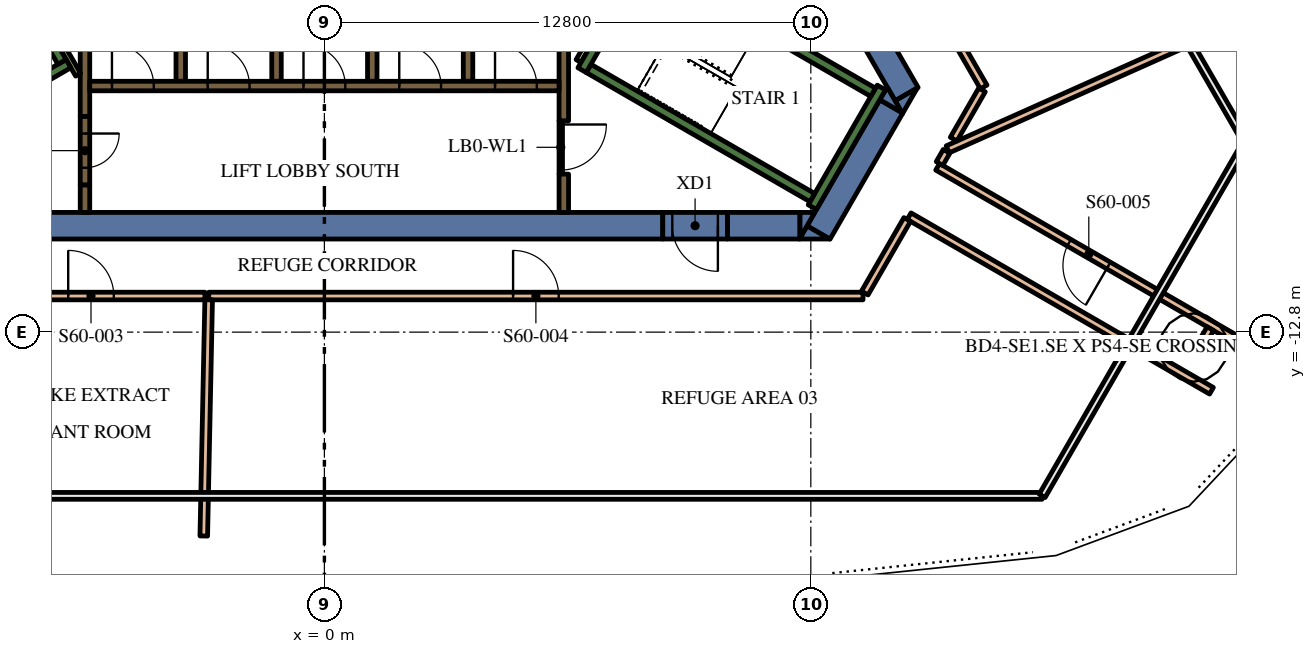
"""IFC4 building model, lengths in metres.
Left out: names, types, materials, properties, quantities, classifications, styles, units other than length and angle.
Written with IfcOpenShell. Run it as: python <this file> out.ifc"""

import sys

from ifc_helpers import new_model, si_unit, direction, frame, frame_2d, origin, place, context, subcontext, project, spatial, polyline, rectangle, outline, extrude, element, fill, save


model = new_model("IFC4")
c1 = context("Model", 3, precision=1e-05, world=origin(), true_north=direction((0.0, 1.0)))
c2 = subcontext(c1, "Body", "Model", "MODEL_VIEW")
j1 = project(units=[si_unit("LENGTHUNIT", "METRE"), si_unit("PLANEANGLEUNIT", "RADIAN")], contexts=[c1])
p1 = place(None, origin())
s1 = spatial("IfcSite", under=j1, at=p1, CompositionType="ELEMENT")
p2 = place(p1, origin())
s2 = spatial("IfcBuilding", under=s1, at=p2, CompositionType="ELEMENT")
p3 = place(p2, frame((0.0, 0.0, 256.2)))
s3 = spatial("IfcBuildingStorey", under=s2, at=p3, CompositionType="ELEMENT", Elevation=256.2)
p4 = place(p3, frame((9.085, 4.264, 0.0), z_axis=(0.0, 0.0, 1.0), x_axis=(0.499998082512, -0.866026510844, 0.0)))
e1 = element("IfcWall", 1, at=p4, inside=s3, PredefinedType="SOLIDWALL", context=c2, shape_type="SweptSolid", body=[
    extrude(rectangle(XDim=12.472, YDim=0.7, at=frame_2d((6.236, 0.0))), origin(), (0.0, 0.0, 1.0), 5.4),
])
p5 = place(p3, origin())
e2 = element("IfcWall", 2, at=p5, inside=s3, PredefinedType="SOLIDWALL", context=c2, shape_type="SweptSolid", body=[
    extrude(outline(polyline([(15.213, -7.05), (15.019, -6.714), (15.601, -6.378), (15.213, -7.05)])), origin(), (0.0, 0.0, 1.0), 5.4),
])
p6 = place(p3, frame((13.003, -10.179, 0.0), z_axis=(0.0, 0.0, 1.0), x_axis=(0.499972675833, 0.866041178825, 0.0)))
e3 = element("IfcWall", 3, at=p6, inside=s3, PredefinedType="SOLIDWALL", context=c2, shape_type="SweptSolid", body=[
    extrude(rectangle(XDim=3.829, YDim=0.7, at=frame_2d((1.915, 0.0))), origin(), (0.0, 0.0, 1.0), 5.4),
])
e4 = element("IfcWall", 4, at=p5, inside=s3, PredefinedType="SOLIDWALL", context=c2, shape_type="SweptSolid", body=[
    extrude(outline(polyline([(12.698, -10.005), (13.296, -10.35), (12.5, -10.35), (12.698, -10.005)])), origin(), (0.0, 0.0, 1.0), 5.4),
])
e5 = element("IfcWall", 5, at=p5, inside=s3, PredefinedType="SOLIDWALL", context=c2, shape_type="SweptSolid", body=[
    extrude(outline(polyline([(14.809, -6.35), (15.197, -7.022), (14.615, -6.686), (14.809, -6.35)])), origin(), (0.0, 0.0, 1.0), 5.4),
])
p7 = place(p3, frame((10.604, -10.0, 0.0), z_axis=(0.0, 0.0, 1.0), x_axis=(1.0, 0.0, 0.0)))
e6 = element("IfcWall", 6, at=p7, inside=s3, PredefinedType="SOLIDWALL", context=c2, shape_type="SweptSolid", body=[
    extrude(rectangle(XDim=1.909, YDim=0.7, at=frame_2d((0.955, 0.0))), origin(), (0.0, 0.0, 1.0), 5.4),
])
e7 = element("IfcWall", 7, at=p5, inside=s3, PredefinedType="SOLIDWALL", context=c2, shape_type="SweptSolid", body=[
    extrude(outline(polyline([(12.904, -9.65), (12.516, -10.322), (12.516, -9.65), (12.904, -9.65)])), origin(), (0.0, 0.0, 1.0), 5.4),
])
p8 = place(p3, frame((8.904, -10.0, 0.0), z_axis=(0.0, 0.0, 1.0), x_axis=(-1.0, 0.0, 0.0)))
e8 = element("IfcWall", 8, at=p8, inside=s3, PredefinedType="SOLIDWALL", context=c2, shape_type="SweptSolid", body=[
    extrude(rectangle(XDim=22.226, YDim=0.7, at=frame_2d((11.113, 0.0))), origin(), (0.0, 0.0, 1.0), 5.4),
])
p9 = place(p3, frame((12.84, -9.511, 0.0), z_axis=(0.0, 0.0, 1.0), x_axis=(0.500048121057, 0.865997619297, 0.0)))
e9 = element("IfcWall", 9, at=p9, inside=s3, PredefinedType="SOLIDWALL", context=c2, shape_type="SweptSolid", body=[
    extrude(rectangle(XDim=3.634, YDim=0.25, at=frame_2d((1.817, 0.0))), origin(), (0.0, 0.0, 1.0), 5.4),
])
p10 = place(p3, frame((12.84, -9.261, 0.0), z_axis=(0.0, 0.0, 1.0), x_axis=(-0.866013990052, 0.500019768644, 0.0)))
e10 = element("IfcWall", 10, at=p10, inside=s3, PredefinedType="SOLIDWALL", context=c2, shape_type="SweptSolid", body=[
    extrude(rectangle(XDim=6.8, YDim=0.25, at=frame_2d((3.4, 0.0))), origin(), (0.0, 0.0, 1.0), 5.4),
])
p11 = place(p3, frame((6.78, -5.906, 0.0), z_axis=(0.0, 0.0, 1.0), x_axis=(0.500223362819, 0.865896406789, 0.0)))
e11 = element("IfcWall", 11, at=p11, inside=s3, PredefinedType="SOLIDWALL", context=c2, shape_type="SweptSolid", body=[
    extrude(rectangle(XDim=0.675, YDim=0.25, at=frame_2d((0.337, 0.0))), origin(), (0.0, 0.0, 1.0), 5.4),
])
for number, where, z_axis, x_axis in (
    (12, (8.334, -2.964, 0.0), (0.0, 0.0, 1.0), (0.866, -0.5, 0.0)),
    (13, (-12.84, -9.261, 0.0), (0.0, 0.0, 1.0), (0.866, 0.5, 0.0)),
):
    element("IfcWall", number, at=place(p3, frame(where, z_axis=z_axis, x_axis=x_axis)), inside=s3, PredefinedType="SOLIDWALL", context=c2, shape_type="SweptSolid", body=[
        extrude(rectangle(XDim=7.05, YDim=0.25, at=frame_2d((3.525, 0.0))), origin(), (0.0, 0.0, 1.0), 5.4),
    ])
p12 = place(p3, frame((-6.905, -5.69, 0.0), z_axis=(0.0, 0.0, 1.0), x_axis=(-0.500402024738, 0.865793170242, 0.0)))
e14 = element("IfcWall", 14, at=p12, inside=s3, PredefinedType="SOLIDWALL", context=c2, shape_type="SweptSolid", body=[
    extrude(rectangle(XDim=0.425, YDim=0.25, at=frame_2d((0.212, 0.0))), origin(), (0.0, 0.0, 1.0), 5.4),
])
p13 = place(p3, frame((-6.3, -8.925, 0.0), z_axis=(0.0, 0.0, 1.0), x_axis=(0.0, -1.0, 0.0)))
e15 = element("IfcWall", 15, at=p13, inside=s3, PredefinedType="SOLIDWALL", context=c2, shape_type="SweptSolid", body=[
    extrude(rectangle(XDim=0.725, YDim=0.25, at=frame_2d((0.363, 0.0))), origin(), (0.0, 0.0, 1.0), 5.4),
])
p14 = place(p3, frame((6.3, -7.24, 0.0), z_axis=(0.0, 0.0, 1.0), x_axis=(0.0, 1.0, 0.0)))
e16 = element("IfcWall", 16, at=p14, inside=s3, PredefinedType="SOLIDWALL", context=c2, shape_type="SweptSolid", body=[
    extrude(rectangle(XDim=3.24, YDim=0.25, at=frame_2d((1.62, 0.0))), origin(), (0.0, 0.0, 1.0), 5.4),
])
p15 = place(p3, frame((6.3, -9.65, 0.0), z_axis=(0.0, 0.0, 1.0), x_axis=(0.0, 1.0, 0.0)))
e17 = element("IfcWall", 17, at=p15, inside=s3, PredefinedType="SOLIDWALL", context=c2, shape_type="SweptSolid", body=[
    extrude(rectangle(XDim=1.008, YDim=0.25, at=frame_2d((0.504, 0.0))), origin(), (0.0, 0.0, 1.0), 5.4),
])
for number, where, z_axis, x_axis in (
    (18, (3.78, -4.0, 0.0), (0.0, 0.0, 1.0), (0.0, -1.0, 0.0)),
    (19, (1.26, -4.0, 0.0), (0.0, 0.0, 1.0), (0.0, -1.0, 0.0)),
    (20, (-1.26, -4.0, 0.0), (0.0, 0.0, 1.0), (0.0, -1.0, 0.0)),
    (21, (-3.78, -4.0, 0.0), (0.0, 0.0, 1.0), (0.0, -1.0, 0.0)),
):
    element("IfcWall", number, at=place(p3, frame(where, z_axis=z_axis, x_axis=x_axis)), inside=s3, PredefinedType="SOLIDWALL", context=c2, shape_type="SweptSolid", body=[
        extrude(rectangle(XDim=2.2, YDim=0.25, at=frame_2d((1.1, 0.0))), origin(), (0.0, 0.0, 1.0), 5.4),
    ])
p16 = place(p3, frame((-6.3, -7.125, 0.0), z_axis=(0.0, 0.0, 1.0), x_axis=(0.0, 1.0, 0.0)))
e22 = element("IfcWall", 22, at=p16, inside=s3, PredefinedType="SOLIDWALL", context=c2, shape_type="SweptSolid", body=[
    extrude(rectangle(XDim=3.125, YDim=0.25, at=frame_2d((1.562, 0.0))), origin(), (0.0, 0.0, 1.0), 5.4),
])
p17 = place(p3, frame((-6.48, -6.027, 0.0), z_axis=(0.0, 0.0, 1.0), x_axis=(-0.499927229454, 0.866067413802, 0.0)))
e23 = element("IfcWall", 23, at=p17, inside=s3, PredefinedType="PARTITIONING", context=c2, shape_type="SweptSolid", body=[
    extrude(rectangle(XDim=0.929, YDim=0.15, at=frame_2d((0.464, 0.0))), origin(), (0.0, 0.0, 1.0), 5.4),
])
p18 = place(p3, frame((6.945, -5.222, 0.0), z_axis=(0.0, 0.0, 1.0), x_axis=(-0.499818422106, -0.866130212453, 0.0)))
e24 = element("IfcWall", 24, at=p18, inside=s3, PredefinedType="PARTITIONING", context=c2, shape_type="SweptSolid", body=[
    extrude(rectangle(XDim=0.514, YDim=0.15, at=frame_2d((0.257, 0.0))), origin(), (0.0, 0.0, 1.0), 4.3),
])
p19 = place(p3, frame((-6.175, -6.325, 0.0), z_axis=(0.0, 0.0, 1.0), x_axis=(1.0, 0.0, 0.0)))
e25 = element("IfcWall", 25, at=p19, inside=s3, PredefinedType="SOLIDWALL", context=c2, shape_type="SweptSolid", body=[
    extrude(rectangle(XDim=12.35, YDim=0.25, at=frame_2d((6.175, 0.0))), origin(), (0.0, 0.0, 1.0), 5.4),
])
p20 = place(p19, frame((0.585, 0.0, 0.0)))
e26 = element("IfcOpeningElement", 26, at=p20, cuts=e25, PredefinedType="OPENING", context=c2, shape_type="SweptSolid", body=[
    extrude(rectangle(XDim=1.1, YDim=2.1, at=frame_2d((0.55, 1.05))), frame((0.0, 0.135, 0.0), z_axis=(0.0, -1.0, 0.0), x_axis=(1.0, 0.0, 0.0)), (0.0, 0.0, 1.0), 0.27),
])
p21 = place(p19, frame((3.105, 0.0, 0.0)))
e27 = element("IfcOpeningElement", 27, at=p21, cuts=e25, PredefinedType="OPENING", context=c2, shape_type="SweptSolid", body=[
    extrude(rectangle(XDim=1.1, YDim=2.1, at=frame_2d((0.55, 1.05))), frame((0.0, 0.135, 0.0), z_axis=(0.0, -1.0, 0.0), x_axis=(1.0, 0.0, 0.0)), (0.0, 0.0, 1.0), 0.27),
])
p22 = place(p19, frame((5.625, 0.0, 0.0)))
e28 = element("IfcOpeningElement", 28, at=p22, cuts=e25, PredefinedType="OPENING", context=c2, shape_type="SweptSolid", body=[
    extrude(rectangle(XDim=1.1, YDim=2.1, at=frame_2d((0.55, 1.05))), frame((0.0, 0.135, 0.0), z_axis=(0.0, -1.0, 0.0), x_axis=(1.0, 0.0, 0.0)), (0.0, 0.0, 1.0), 0.27),
])
p23 = place(p19, frame((8.145, 0.0, 0.0)))
e29 = element("IfcOpeningElement", 29, at=p23, cuts=e25, PredefinedType="OPENING", context=c2, shape_type="SweptSolid", body=[
    extrude(rectangle(XDim=1.1, YDim=2.1, at=frame_2d((0.55, 1.05))), frame((0.0, 0.135, 0.0), z_axis=(0.0, -1.0, 0.0), x_axis=(1.0, 0.0, 0.0)), (0.0, 0.0, 1.0), 0.27),
])
p24 = place(p19, frame((10.665, 0.0, 0.0)))
e30 = element("IfcOpeningElement", 30, at=p24, cuts=e25, PredefinedType="OPENING", context=c2, shape_type="SweptSolid", body=[
    extrude(rectangle(XDim=1.1, YDim=2.1, at=frame_2d((0.55, 1.05))), frame((0.0, 0.135, 0.0), z_axis=(0.0, -1.0, 0.0), x_axis=(1.0, 0.0, 0.0)), (0.0, 0.0, 1.0), 0.27),
])
p25 = place(p3, frame((-6.3, -7.125, 0.0), z_axis=(0.0, 0.0, 1.0), x_axis=(0.0, -1.0, 0.0)))
e31 = element("IfcWall", 31, at=p25, inside=s3, PredefinedType="SOLIDWALL", context=c2, shape_type="SweptSolid", body=[
    extrude(rectangle(XDim=1.8, YDim=0.25, at=frame_2d((0.9, 0.0))), origin(), (0.0, 0.0, 1.0), 5.4),
])
p26 = place(p25, frame((0.45, 0.0, 0.0)))
e32 = element("IfcOpeningElement", 32, at=p26, cuts=e31, PredefinedType="OPENING", context=c2, shape_type="SweptSolid", body=[
    extrude(rectangle(XDim=0.9, YDim=2.1, at=frame_2d((0.45, 1.05))), frame((0.0, 0.135, 0.0), z_axis=(0.0, -1.0, 0.0), x_axis=(1.0, 0.0, 0.0)), (0.0, 0.0, 1.0), 0.27),
])
p27 = place(p3, frame((6.22, -7.237, 0.0), z_axis=(0.0, 0.0, 1.0), x_axis=(0.0, -1.0, 0.0)))
e33 = element("IfcWall", 33, at=p27, inside=s3, PredefinedType="PARTITIONING", context=c2, shape_type="SweptSolid", body=[
    extrude(rectangle(XDim=1.4, YDim=0.09, at=frame_2d((0.7, 0.0))), origin(), (0.0, 0.0, 1.0), 4.3),
])
p28 = place(p27, frame((0.1, 0.0, 0.0)))
e34 = element("IfcOpeningElement", 34, at=p28, cuts=e33, PredefinedType="OPENING", context=c2, shape_type="SweptSolid", body=[
    extrude(rectangle(XDim=1.2, YDim=2.1, at=frame_2d((0.6, 1.05))), frame((0.0, 0.055, 0.0), z_axis=(0.0, -1.0, 0.0), x_axis=(1.0, 0.0, 0.0)), (0.0, 0.0, 1.0), 0.11),
])
p29 = place(p3, frame((10.604, -10.0, 0.0), z_axis=(0.0, 0.0, 1.0), x_axis=(-1.0, 0.0, 0.0)))
e35 = element("IfcWall", 35, at=p29, inside=s3, PredefinedType="SOLIDWALL", context=c2, shape_type="SweptSolid", body=[
    extrude(rectangle(XDim=1.7, YDim=0.7, at=frame_2d((0.85, 0.0))), origin(), (0.0, 0.0, 1.0), 5.4),
])
p30 = place(p29, frame((0.25, 0.0, 0.0)))
e36 = element("IfcOpeningElement", 36, at=p30, cuts=e35, PredefinedType="OPENING", context=c2, shape_type="SweptSolid", body=[
    extrude(rectangle(XDim=1.2, YDim=2.1, at=frame_2d((0.6, 1.05))), frame((0.0, 0.36, 0.0), z_axis=(0.0, -1.0, 0.0), x_axis=(1.0, 0.0, 0.0)), (0.0, 0.0, 1.0), 0.72),
])
p31 = place(p3, frame((-3.043, -11.85, 0.0), z_axis=(0.0, 0.0, 1.0), x_axis=(1.0, 0.0, 0.0)))
e37 = element("IfcWall", 37, at=p31, inside=s3, PredefinedType="PARTITIONING", context=c2, shape_type="SweptSolid", body=[
    extrude(rectangle(XDim=17.217, YDim=0.2, at=frame_2d((8.608, 0.0))), origin(), (0.0, 0.0, 1.0), 4.3),
])
p32 = place(p31, frame((8.009, 0.0, 0.0)))
e38 = element("IfcOpeningElement", 38, at=p32, cuts=e37, PredefinedType="OPENING", context=c2, shape_type="SweptSolid", body=[
    extrude(rectangle(XDim=1.2, YDim=2.1, at=frame_2d((0.6, 1.05))), frame((0.0, 0.11, 0.0), z_axis=(0.0, -1.0, 0.0), x_axis=(1.0, 0.0, 0.0)), (0.0, 0.0, 1.0), 0.22),
])
p33 = place(p3, frame((23.343, -14.343, 0.0), z_axis=(0.0, 0.0, 1.0), x_axis=(-0.866028486751, 0.499994660107, 0.0)))
e39 = element("IfcWall", 39, at=p33, inside=s3, PredefinedType="PARTITIONING", context=c2, shape_type="SweptSolid", body=[
    extrude(rectangle(XDim=9.187, YDim=0.2, at=frame_2d((4.594, 0.0))), origin(), (0.0, 0.0, 1.0), 4.3),
])
p34 = place(p3, frame((24.093, -13.044, 0.0), z_axis=(0.0, 0.0, 1.0), x_axis=(-0.866028486751, 0.499994660107, 0.0)))
e40 = element("IfcWall", 40, at=p34, inside=s3, PredefinedType="PARTITIONING", context=c2, shape_type="SweptSolid", body=[
    extrude(rectangle(XDim=9.187, YDim=0.2, at=frame_2d((4.594, 0.0))), origin(), (0.0, 0.0, 1.0), 4.3),
])
p35 = place(p34, frame((3.993, 0.0, 0.0)))
e41 = element("IfcOpeningElement", 41, at=p35, cuts=e40, PredefinedType="OPENING", context=c2, shape_type="SweptSolid", body=[
    extrude(rectangle(XDim=1.2, YDim=2.1, at=frame_2d((0.6, 1.05))), frame((0.0, 0.11, 0.0), z_axis=(0.0, -1.0, 0.0), x_axis=(1.0, 0.0, 0.0)), (0.0, 0.0, 1.0), 0.22),
])
p36 = place(p3, frame((16.402, -7.991, 0.0), z_axis=(0.0, 0.0, 1.0), x_axis=(0.913168751413, 0.407581686834, 0.0)))
e42 = element("IfcWall", 42, at=p36, inside=s3, PredefinedType="PARTITIONING", context=c2, shape_type="SweptSolid", body=[
    extrude(rectangle(XDim=7.202, YDim=0.2, at=frame_2d((3.601, 0.0))), origin(), (0.0, 0.0, 1.0), 4.3),
])
p37 = place(p3, frame((-3.045, -11.95, 0.0), z_axis=(0.0, 0.0, 1.0), x_axis=(-0.02077728557, -0.999784128902, 0.0)))
e43 = element("IfcWall", 43, at=p37, inside=s3, PredefinedType="PARTITIONING", context=c2, shape_type="SweptSolid", body=[
    extrude(rectangle(XDim=6.216, YDim=0.2, at=frame_2d((3.108, 0.0))), origin(), (0.0, 0.0, 1.0), 4.3),
])
p38 = place(p3, frame((-9.14, -11.85, 0.0), z_axis=(0.0, 0.0, 1.0), x_axis=(1.0, 0.0, 0.0)))
e44 = element("IfcWall", 44, at=p38, inside=s3, PredefinedType="PARTITIONING", context=c2, shape_type="SweptSolid", body=[
    extrude(rectangle(XDim=5.997, YDim=0.2, at=frame_2d((2.999, 0.0))), origin(), (0.0, 0.0, 1.0), 4.3),
])
p39 = place(p38, frame((2.398, 0.0, 0.0)))
e45 = element("IfcOpeningElement", 45, at=p39, cuts=e44, PredefinedType="OPENING", context=c2, shape_type="SweptSolid", body=[
    extrude(rectangle(XDim=1.2, YDim=2.1, at=frame_2d((0.6, 1.05))), frame((0.0, 0.11, 0.0), z_axis=(0.0, -1.0, 0.0), x_axis=(1.0, 0.0, 0.0)), (0.0, 0.0, 1.0), 0.22),
])
p40 = place(p3, frame((17.349, -6.35, 0.0), z_axis=(0.0, 0.0, 1.0), x_axis=(-0.499994255055, 0.866028720605, 0.0)))
e46 = element("IfcWall", 46, at=p40, inside=s3, PredefinedType="PARTITIONING", context=c2, shape_type="SweptSolid", body=[
    extrude(rectangle(XDim=4.924, YDim=0.2, at=frame_2d((2.462, 0.0))), origin(), (0.0, 0.0, 1.0), 4.3),
])
p41 = place(p40, frame((1.862, 0.0, 0.0)))
e47 = element("IfcOpeningElement", 47, at=p41, cuts=e46, PredefinedType="OPENING", context=c2, shape_type="SweptSolid", body=[
    extrude(rectangle(XDim=1.2, YDim=2.1, at=frame_2d((0.6, 1.05))), frame((0.0, 0.11, 0.0), z_axis=(0.0, -1.0, 0.0), x_axis=(1.0, 0.0, 0.0)), (0.0, 0.0, 1.0), 0.22),
])
p42 = place(p3, frame((15.337, -9.836, 0.0), z_axis=(0.0, 0.0, 1.0), x_axis=(-0.499968249168, -0.86604373436, 0.0)))
e48 = element("IfcWall", 48, at=p42, inside=s3, PredefinedType="PARTITIONING", context=c2, shape_type="SweptSolid", body=[
    extrude(rectangle(XDim=2.236, YDim=0.2, at=frame_2d((1.118, 0.0))), origin(), (0.0, 0.0, 1.0), 4.3),
])
p43 = place(p3, frame((17.304, -6.428, 0.0), z_axis=(0.0, 0.0, 1.0), x_axis=(-0.500108879088, -0.865962533287, 0.0)))
e49 = element("IfcWall", 49, at=p43, inside=s3, PredefinedType="PARTITIONING", context=c2, shape_type="SweptSolid", body=[
    extrude(rectangle(XDim=1.495, YDim=0.2, at=frame_2d((0.748, 0.0))), origin(), (0.0, 0.0, 1.0), 4.3),
])
p44 = place(p3, frame((23.313, -12.709, 0.0), z_axis=(0.0, 0.0, 1.0), x_axis=(-0.500014506688, -0.866017028182, 0.0)))
e50 = element("IfcWall", 50, at=p44, inside=s3, PredefinedType="PARTITIONING", context=c2, shape_type="SweptSolid", body=[
    extrude(rectangle(XDim=0.603, YDim=0.2, at=frame_2d((0.302, 0.0))), origin(), (0.0, 0.0, 1.0), 4.3),
])
p45 = place(p3, frame((16.372, -8.042, 0.0), z_axis=(0.0, 0.0, 1.0), x_axis=(-0.499817339582, -0.866130837145, 0.0)))
e51 = element("IfcWall", 51, at=p45, inside=s3, PredefinedType="PARTITIONING", context=c2, shape_type="SweptSolid", body=[
    extrude(rectangle(XDim=0.371, YDim=0.2, at=frame_2d((0.186, 0.0))), origin(), (0.0, 0.0, 1.0), 4.3),
])
p46 = place(p20, origin())
e52 = element("IfcDoor", 52, at=p46, inside=s3, OperationType="DOUBLE_DOOR_SLIDING", PredefinedType="DOOR", context=c2, shape_type="SweptSolid", body=[
    extrude(rectangle(XDim=1.1, YDim=2.1, at=frame_2d((0.55, 1.05))), frame((0.0, 0.025, 0.0), z_axis=(0.0, -1.0, 0.0), x_axis=(1.0, 0.0, 0.0)), (0.0, 0.0, 1.0), 0.05),
])
fill(e26, e52)
p47 = place(p21, origin())
e53 = element("IfcDoor", 53, at=p47, inside=s3, OperationType="DOUBLE_DOOR_SLIDING", PredefinedType="DOOR", context=c2, shape_type="SweptSolid", body=[
    extrude(rectangle(XDim=1.1, YDim=2.1, at=frame_2d((0.55, 1.05))), frame((0.0, 0.025, 0.0), z_axis=(0.0, -1.0, 0.0), x_axis=(1.0, 0.0, 0.0)), (0.0, 0.0, 1.0), 0.05),
])
fill(e27, e53)
p48 = place(p22, origin())
e54 = element("IfcDoor", 54, at=p48, inside=s3, OperationType="DOUBLE_DOOR_SLIDING", PredefinedType="DOOR", context=c2, shape_type="SweptSolid", body=[
    extrude(rectangle(XDim=1.1, YDim=2.1, at=frame_2d((0.55, 1.05))), frame((0.0, 0.025, 0.0), z_axis=(0.0, -1.0, 0.0), x_axis=(1.0, 0.0, 0.0)), (0.0, 0.0, 1.0), 0.05),
])
fill(e28, e54)
p49 = place(p23, origin())
e55 = element("IfcDoor", 55, at=p49, inside=s3, OperationType="DOUBLE_DOOR_SLIDING", PredefinedType="DOOR", context=c2, shape_type="SweptSolid", body=[
    extrude(rectangle(XDim=1.1, YDim=2.1, at=frame_2d((0.55, 1.05))), frame((0.0, 0.025, 0.0), z_axis=(0.0, -1.0, 0.0), x_axis=(1.0, 0.0, 0.0)), (0.0, 0.0, 1.0), 0.05),
])
fill(e29, e55)
p50 = place(p24, origin())
e56 = element("IfcDoor", 56, at=p50, inside=s3, OperationType="DOUBLE_DOOR_SLIDING", PredefinedType="DOOR", context=c2, shape_type="SweptSolid", body=[
    extrude(rectangle(XDim=1.1, YDim=2.1, at=frame_2d((0.55, 1.05))), frame((0.0, 0.025, 0.0), z_axis=(0.0, -1.0, 0.0), x_axis=(1.0, 0.0, 0.0)), (0.0, 0.0, 1.0), 0.05),
])
fill(e30, e56)
p51 = place(p26, origin())
e57 = element("IfcDoor", 57, at=p51, inside=s3, OperationType="SINGLE_SWING_LEFT", PredefinedType="DOOR", context=c2, shape_type="SweptSolid", body=[
    extrude(rectangle(XDim=0.9, YDim=2.1, at=frame_2d((0.45, 1.05))), frame((0.0, 0.025, 0.0), z_axis=(0.0, -1.0, 0.0), x_axis=(1.0, 0.0, 0.0)), (0.0, 0.0, 1.0), 0.05),
])
fill(e32, e57)
p52 = place(p28, origin())
e58 = element("IfcDoor", 58, at=p52, inside=s3, OperationType="SINGLE_SWING_LEFT", PredefinedType="DOOR", context=c2, shape_type="SweptSolid", body=[
    extrude(rectangle(XDim=1.2, YDim=2.1, at=frame_2d((0.6, 1.05))), frame((0.0, 0.025, 0.0), z_axis=(0.0, -1.0, 0.0), x_axis=(1.0, 0.0, 0.0)), (0.0, 0.0, 1.0), 0.05),
])
fill(e34, e58)
p53 = place(p30, origin())
e59 = element("IfcDoor", 59, at=p53, inside=s3, OperationType="SINGLE_SWING_LEFT", PredefinedType="DOOR", context=c2, shape_type="SweptSolid", body=[
    extrude(rectangle(XDim=1.2, YDim=2.1, at=frame_2d((0.6, 1.05))), frame((0.0, 0.025, 0.0), z_axis=(0.0, -1.0, 0.0), x_axis=(1.0, 0.0, 0.0)), (0.0, 0.0, 1.0), 0.05),
])
fill(e36, e59)
p54 = place(p39, origin())
e60 = element("IfcDoor", 60, at=p54, inside=s3, OperationType="SINGLE_SWING_RIGHT", PredefinedType="DOOR", context=c2, shape_type="SweptSolid", body=[
    extrude(rectangle(XDim=1.2, YDim=2.1, at=frame_2d((0.6, 1.05))), frame((0.0, 0.025, 0.0), z_axis=(0.0, -1.0, 0.0), x_axis=(1.0, 0.0, 0.0)), (0.0, 0.0, 1.0), 0.05),
])
fill(e45, e60)
p55 = place(p32, origin())
e61 = element("IfcDoor", 61, at=p55, inside=s3, OperationType="SINGLE_SWING_LEFT", PredefinedType="DOOR", context=c2, shape_type="SweptSolid", body=[
    extrude(rectangle(XDim=1.2, YDim=2.1, at=frame_2d((0.6, 1.05))), frame((0.0, 0.025, 0.0), z_axis=(0.0, -1.0, 0.0), x_axis=(1.0, 0.0, 0.0)), (0.0, 0.0, 1.0), 0.05),
])
fill(e38, e61)
p56 = place(p35, origin())
e62 = element("IfcDoor", 62, at=p56, inside=s3, OperationType="SINGLE_SWING_RIGHT", PredefinedType="DOOR", context=c2, shape_type="SweptSolid", body=[
    extrude(rectangle(XDim=1.2, YDim=2.1, at=frame_2d((0.6, 1.05))), frame((0.0, 0.025, 0.0), z_axis=(0.0, -1.0, 0.0), x_axis=(1.0, 0.0, 0.0)), (0.0, 0.0, 1.0), 0.05),
])
fill(e41, e62)
save(model, sys.argv[1])
